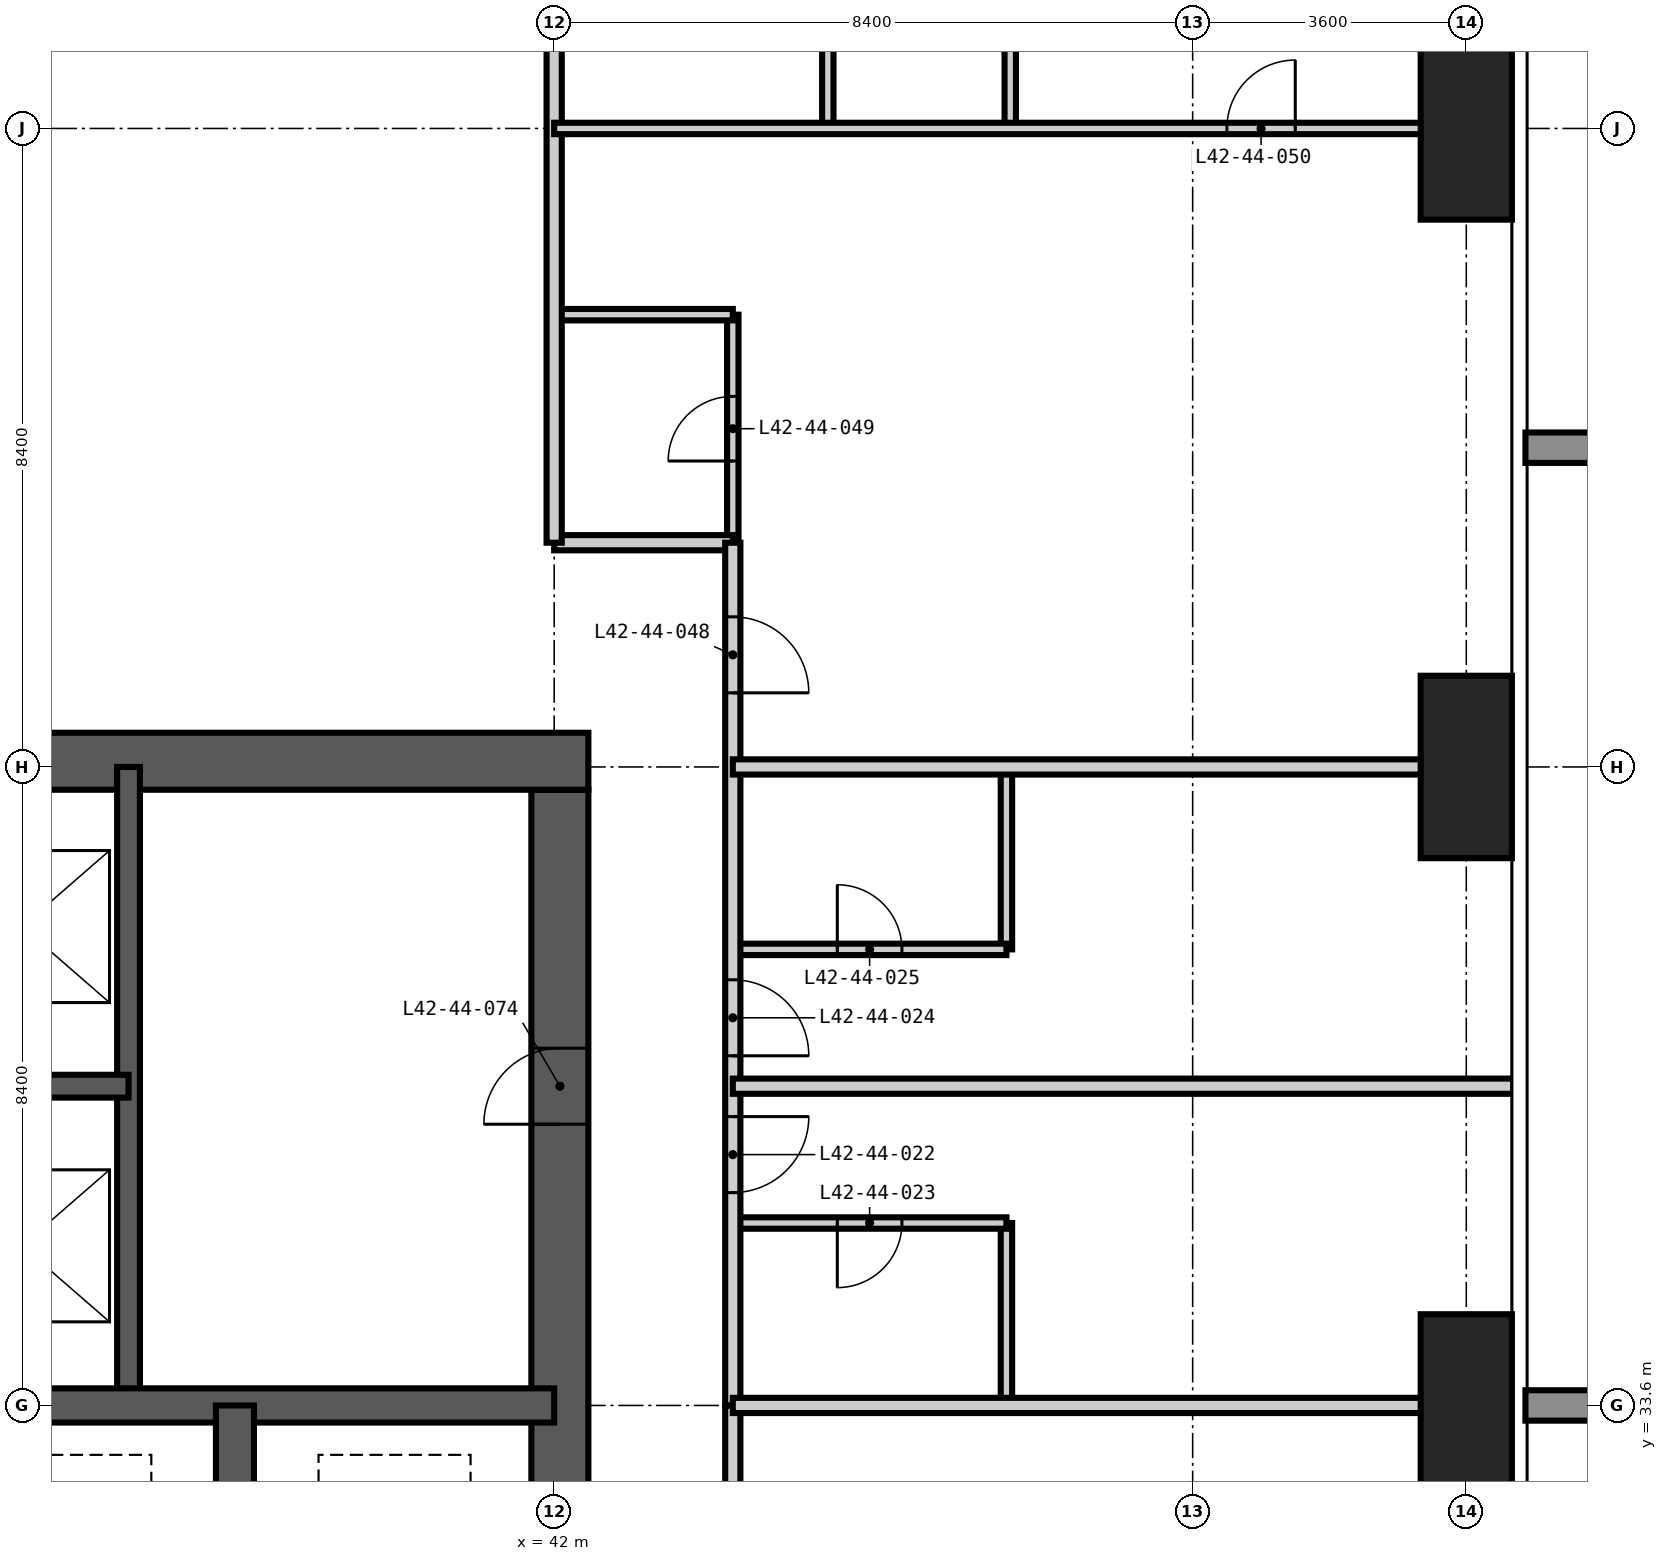
"""IFC4 building model, lengths in metres.
Left out: names, types, materials, properties, quantities, classifications, styles, units other than length and angle.
Written with IfcOpenShell. Run it as: python <this file> out.ifc"""

import sys

from ifc_helpers import new_model, si_unit, direction, frame, frame_2d, origin, origin_2d, place, context, subcontext, project, spatial, rectangle, extrude, element, fill, save


model = new_model("IFC4")
c1 = context("Model", 3, precision=1e-05, world=origin(), true_north=direction((0.0, 1.0)))
c2 = subcontext(c1, "Body", "Model", "MODEL_VIEW")
j1 = project(units=[si_unit("LENGTHUNIT", "METRE"), si_unit("PLANEANGLEUNIT", "RADIAN")], contexts=[c1])
p1 = place(None, origin())
s1 = spatial("IfcSite", under=j1, at=p1, CompositionType="ELEMENT")
p2 = place(p1, origin())
s2 = spatial("IfcBuilding", under=s1, at=p2, CompositionType="ELEMENT")
p3 = place(p2, frame((0.0, 0.0, 166.2)))
s3 = spatial("IfcBuildingStorey", under=s2, at=p3, CompositionType="ELEMENT", Elevation=166.2)
for number, where, z_axis, x_axis in (
    (1, (54.0, 33.6, -0.35), (0.0, 0.0, 1.0), (1.0, 0.0, 0.0)),
    (2, (54.0, 42.0, -0.35), (0.0, 0.0, 1.0), (1.0, 0.0, 0.0)),
    (3, (54.0, 50.4, -0.35), (0.0, 0.0, 1.0), (1.0, 0.0, 0.0)),
):
    element("IfcColumn", number, at=place(p3, frame(where, z_axis=z_axis, x_axis=x_axis)), inside=s3, PredefinedType="COLUMN", context=c2, shape_type="SweptSolid", body=[
        extrude(rectangle(XDim=1.2, YDim=2.4, at=origin_2d()), origin(), (0.0, 0.0, 1.0), 3.6),
    ])
p4 = place(p3, frame((42.075, 17.1, -0.35), z_axis=(0.0, 0.0, 1.0), x_axis=(0.0, 1.0, 0.0)))
e4 = element("IfcWall", 4, at=p4, inside=s3, PredefinedType="SHEAR", context=c2, shape_type="SweptSolid", body=[
    extrude(rectangle(XDim=24.6, YDim=0.75, at=frame_2d((12.3, 0.0))), origin(), (0.0, 0.0, 1.0), 3.6),
])
p5 = place(p4, frame((0.5, 0.0, 0.35)))
e5 = element("IfcOpeningElement", 5, at=p5, cuts=e4, PredefinedType="OPENING", context=c2, shape_type="SweptSolid", body=[
    extrude(rectangle(XDim=1.2, YDim=2.2, at=frame_2d((0.6, 1.1))), frame((0.0, 0.385, 0.0), z_axis=(0.0, -1.0, 0.0), x_axis=(1.0, 0.0, 0.0)), (0.0, 0.0, 1.0), 0.77),
])
p6 = place(p4, frame((11.8, 0.0, 0.35)))
e6 = element("IfcOpeningElement", 6, at=p6, cuts=e4, PredefinedType="OPENING", context=c2, shape_type="SweptSolid", body=[
    extrude(rectangle(XDim=1.0, YDim=2.1, at=frame_2d((0.5, 1.05))), frame((0.0, 0.385, 0.0), z_axis=(0.0, -1.0, 0.0), x_axis=(1.0, 0.0, 0.0)), (0.0, 0.0, 1.0), 0.77),
])
p7 = place(p4, frame((20.2, 0.0, 0.35)))
e7 = element("IfcOpeningElement", 7, at=p7, cuts=e4, PredefinedType="OPENING", context=c2, shape_type="SweptSolid", body=[
    extrude(rectangle(XDim=1.0, YDim=2.1, at=frame_2d((0.5, 1.05))), frame((0.0, 0.385, 0.0), z_axis=(0.0, -1.0, 0.0), x_axis=(1.0, 0.0, 0.0)), (0.0, 0.0, 1.0), 0.77),
])
p8 = place(p3, frame((42.45, 42.075, -0.35), z_axis=(0.0, 0.0, 1.0), x_axis=(-1.0, 0.0, 0.0)))
e8 = element("IfcWall", 8, at=p8, inside=s3, PredefinedType="SHEAR", context=c2, shape_type="SweptSolid", body=[
    extrude(rectangle(XDim=26.1, YDim=0.75, at=frame_2d((13.05, 0.0))), origin(), (0.0, 0.0, 1.0), 3.6),
])
p9 = place(p8, frame((20.95, 0.0, 0.35)))
e9 = element("IfcOpeningElement", 9, at=p9, cuts=e8, PredefinedType="OPENING", context=c2, shape_type="SweptSolid", body=[
    extrude(rectangle(XDim=1.0, YDim=2.1, at=frame_2d((0.5, 1.05))), frame((0.0, 0.385, 0.0), z_axis=(0.0, -1.0, 0.0), x_axis=(1.0, 0.0, 0.0)), (0.0, 0.0, 1.0), 0.77),
])
p10 = place(p8, frame((10.35, 0.0, 0.35)))
e10 = element("IfcOpeningElement", 10, at=p10, cuts=e8, PredefinedType="OPENING", context=c2, shape_type="SweptSolid", body=[
    extrude(rectangle(XDim=1.2, YDim=2.2, at=frame_2d((0.6, 1.1))), frame((0.0, 0.385, 0.0), z_axis=(0.0, -1.0, 0.0), x_axis=(1.0, 0.0, 0.0)), (0.0, 0.0, 1.0), 0.77),
])
p11 = place(p3, frame((36.4, 33.6, -0.35), z_axis=(0.0, 0.0, 1.0), x_axis=(0.0, 1.0, 0.0)))
e11 = element("IfcWall", 11, at=p11, inside=s3, PredefinedType="SHEAR", context=c2, shape_type="SweptSolid", body=[
    extrude(rectangle(XDim=8.4, YDim=0.3, at=frame_2d((4.2, 0.0))), origin(), (0.0, 0.0, 1.0), 3.6),
])
p12 = place(p3, frame((33.6, 37.8, -0.35), z_axis=(0.0, 0.0, 1.0), x_axis=(1.0, 0.0, 0.0)))
e12 = element("IfcWall", 12, at=p12, inside=s3, PredefinedType="SHEAR", context=c2, shape_type="SweptSolid", body=[
    extrude(rectangle(XDim=2.8, YDim=0.3, at=frame_2d((1.4, 0.0))), origin(), (0.0, 0.0, 1.0), 3.6),
])
p13 = place(p3, frame((16.8, 33.6, -0.35), z_axis=(0.0, 0.0, 1.0), x_axis=(1.0, 0.0, 0.0)))
e13 = element("IfcWall", 13, at=p13, inside=s3, PredefinedType="SHEAR", context=c2, shape_type="SweptSolid", body=[
    extrude(rectangle(XDim=25.2, YDim=0.45, at=frame_2d((12.6, 0.0))), origin(), (0.0, 0.0, 1.0), 3.6),
])
p14 = place(p3, frame((37.8, 30.8, -0.35), z_axis=(0.0, 0.0, 1.0), x_axis=(0.0, 1.0, 0.0)))
e14 = element("IfcWall", 14, at=p14, inside=s3, PredefinedType="SHEAR", context=c2, shape_type="SweptSolid", body=[
    extrude(rectangle(XDim=2.8, YDim=0.5, at=frame_2d((1.4, 0.0))), origin(), (0.0, 0.0, 1.0), 3.6),
])
p15 = place(p3, frame((44.35, 44.95, 0.0), z_axis=(0.0, 0.0, 1.0), x_axis=(0.0, 1.0, 0.0)))
e15 = element("IfcWall", 15, at=p15, inside=s3, PredefinedType="PARTITIONING", context=c2, shape_type="SweptSolid", body=[
    extrude(rectangle(XDim=3.0, YDim=0.15, at=frame_2d((1.5, 0.0))), origin(), (0.0, 0.0, 1.0), 3.25),
])
p16 = place(p15, frame((1.075, 0.0, 0.0)))
e16 = element("IfcOpeningElement", 16, at=p16, cuts=e15, PredefinedType="OPENING", context=c2, shape_type="SweptSolid", body=[
    extrude(rectangle(XDim=0.85, YDim=2.1, at=frame_2d((0.425, 1.05))), frame((0.0, 0.085, 0.0), z_axis=(0.0, -1.0, 0.0), x_axis=(1.0, 0.0, 0.0)), (0.0, 0.0, 1.0), 0.17),
])
for number, where, z_axis, x_axis in (
    (17, (47.95, 33.6, 0.0), (0.0, 0.0, 1.0), (0.0, 1.0, 0.0)),
    (18, (47.95, 39.6, 0.0), (0.0, 0.0, 1.0), (0.0, 1.0, 0.0)),
):
    element("IfcWall", number, at=place(p3, frame(where, z_axis=z_axis, x_axis=x_axis)), inside=s3, PredefinedType="PARTITIONING", context=c2, shape_type="SweptSolid", body=[
        extrude(rectangle(XDim=2.4, YDim=0.15, at=frame_2d((1.2, 0.0))), origin(), (0.0, 0.0, 1.0), 3.25),
    ])
p17 = place(p3, frame((44.35, 36.0, 0.0), z_axis=(0.0, 0.0, 1.0), x_axis=(1.0, 0.0, 0.0)))
e19 = element("IfcWall", 19, at=p17, inside=s3, PredefinedType="PARTITIONING", context=c2, shape_type="SweptSolid", body=[
    extrude(rectangle(XDim=3.6, YDim=0.15, at=frame_2d((1.8, 0.0))), origin(), (0.0, 0.0, 1.0), 3.25),
])
p18 = place(p17, frame((1.375, 0.0, 0.0)))
e20 = element("IfcOpeningElement", 20, at=p18, cuts=e19, PredefinedType="OPENING", context=c2, shape_type="SweptSolid", body=[
    extrude(rectangle(XDim=0.85, YDim=2.1, at=frame_2d((0.425, 1.05))), frame((0.0, 0.085, 0.0), z_axis=(0.0, -1.0, 0.0), x_axis=(1.0, 0.0, 0.0)), (0.0, 0.0, 1.0), 0.17),
])
p19 = place(p3, frame((44.35, 39.6, 0.0), z_axis=(0.0, 0.0, 1.0), x_axis=(1.0, 0.0, 0.0)))
e21 = element("IfcWall", 21, at=p19, inside=s3, PredefinedType="PARTITIONING", context=c2, shape_type="SweptSolid", body=[
    extrude(rectangle(XDim=3.6, YDim=0.15, at=frame_2d((1.8, 0.0))), origin(), (0.0, 0.0, 1.0), 3.25),
])
p20 = place(p19, frame((1.375, 0.0, 0.0)))
e22 = element("IfcOpeningElement", 22, at=p20, cuts=e21, PredefinedType="OPENING", context=c2, shape_type="SweptSolid", body=[
    extrude(rectangle(XDim=0.85, YDim=2.1, at=frame_2d((0.425, 1.05))), frame((0.0, 0.085, 0.0), z_axis=(0.0, -1.0, 0.0), x_axis=(1.0, 0.0, 0.0)), (0.0, 0.0, 1.0), 0.17),
])
p21 = place(p3, frame((42.0, 47.95, 0.0), z_axis=(0.0, 0.0, 1.0), x_axis=(1.0, 0.0, 0.0)))
e23 = element("IfcWall", 23, at=p21, inside=s3, PredefinedType="PARTITIONING", context=c2, shape_type="SweptSolid", body=[
    extrude(rectangle(XDim=2.35, YDim=0.15, at=frame_2d((1.175, 0.0))), origin(), (0.0, 0.0, 1.0), 3.25),
])
p22 = place(p3, frame((44.35, 25.2, 0.0), z_axis=(0.0, 0.0, 1.0), x_axis=(0.0, 1.0, 0.0)))
e24 = element("IfcWall", 24, at=p22, inside=s3, PredefinedType="PARTITIONING", context=c2, shape_type="SweptSolid", body=[
    extrude(rectangle(XDim=8.4, YDim=0.2, at=frame_2d((4.2, 0.0))), origin(), (0.0, 0.0, 1.0), 3.25),
])
p23 = place(p22, frame((3.3, 0.0, 0.0)))
e25 = element("IfcOpeningElement", 25, at=p23, cuts=e24, PredefinedType="OPENING", context=c2, shape_type="SweptSolid", body=[
    extrude(rectangle(XDim=1.8, YDim=2.4, at=frame_2d((0.9, 1.2))), frame((0.0, 0.11, 0.0), z_axis=(0.0, -1.0, 0.0), x_axis=(1.0, 0.0, 0.0)), (0.0, 0.0, 1.0), 0.22),
])
p24 = place(p3, frame((42.0, 44.95, 0.0), z_axis=(0.0, 0.0, 1.0), x_axis=(1.0, 0.0, 0.0)))
e26 = element("IfcWall", 26, at=p24, inside=s3, PredefinedType="PARTITIONING", context=c2, shape_type="SweptSolid", body=[
    extrude(rectangle(XDim=2.35, YDim=0.2, at=frame_2d((1.175, 0.0))), origin(), (0.0, 0.0, 1.0), 3.25),
])
p25 = place(p3, frame((42.0, 54.618, 0.0), z_axis=(0.0, 0.0, 1.0), x_axis=(0.0, -1.0, 0.0)))
e27 = element("IfcWall", 27, at=p25, inside=s3, PredefinedType="PARTITIONING", context=c2, shape_type="SweptSolid", body=[
    extrude(rectangle(XDim=9.668, YDim=0.2, at=frame_2d((4.834, 0.0))), origin(), (0.0, 0.0, 1.0), 3.25),
])
p26 = place(p3, frame((44.35, 44.95, 0.0), z_axis=(0.0, 0.0, 1.0), x_axis=(0.0, -1.0, 0.0)))
e28 = element("IfcWall", 28, at=p26, inside=s3, PredefinedType="PARTITIONING", context=c2, shape_type="SweptSolid", body=[
    extrude(rectangle(XDim=11.35, YDim=0.2, at=frame_2d((5.675, 0.0))), origin(), (0.0, 0.0, 1.0), 3.25),
])
p27 = place(p26, frame((7.55, 0.0, 0.0)))
e29 = element("IfcOpeningElement", 29, at=p27, cuts=e28, PredefinedType="OPENING", context=c2, shape_type="SweptSolid", body=[
    extrude(rectangle(XDim=1.0, YDim=2.2, at=frame_2d((0.5, 1.1))), frame((0.0, 0.11, 0.0), z_axis=(0.0, -1.0, 0.0), x_axis=(1.0, 0.0, 0.0)), (0.0, 0.0, 1.0), 0.22),
])
p28 = place(p26, frame((5.75, 0.0, 0.0)))
e30 = element("IfcOpeningElement", 30, at=p28, cuts=e28, PredefinedType="OPENING", context=c2, shape_type="SweptSolid", body=[
    extrude(rectangle(XDim=1.0, YDim=2.2, at=frame_2d((0.5, 1.1))), frame((0.0, 0.11, 0.0), z_axis=(0.0, -1.0, 0.0), x_axis=(1.0, 0.0, 0.0)), (0.0, 0.0, 1.0), 0.22),
])
p29 = place(p26, frame((0.975, 0.0, 0.0)))
e31 = element("IfcOpeningElement", 31, at=p29, cuts=e28, PredefinedType="OPENING", context=c2, shape_type="SweptSolid", body=[
    extrude(rectangle(XDim=1.0, YDim=2.2, at=frame_2d((0.5, 1.1))), frame((0.0, 0.11, 0.0), z_axis=(0.0, -1.0, 0.0), x_axis=(1.0, 0.0, 0.0)), (0.0, 0.0, 1.0), 0.22),
])
for number, where, z_axis, x_axis in (
    (32, (44.35, 33.6, 0.0), (0.0, 0.0, 1.0), (1.0, 0.0, 0.0)),
    (33, (44.35, 37.8, 0.0), (0.0, 0.0, 1.0), (1.0, 0.0, 0.0)),
    (34, (44.35, 42.0, 0.0), (0.0, 0.0, 1.0), (1.0, 0.0, 0.0)),
):
    element("IfcWall", number, at=place(p3, frame(where, z_axis=z_axis, x_axis=x_axis)), inside=s3, PredefinedType="PARTITIONING", context=c2, shape_type="SweptSolid", body=[
        extrude(rectangle(XDim=10.268, YDim=0.2, at=frame_2d((5.134, 0.0))), origin(), (0.0, 0.0, 1.0), 3.25),
    ])
p30 = place(p3, frame((45.6, 50.4, 0.0), z_axis=(0.0, 0.0, 1.0), x_axis=(0.0, 1.0, 0.0)))
e35 = element("IfcWall", 35, at=p30, inside=s3, PredefinedType="PARTITIONING", context=c2, shape_type="SweptSolid", body=[
    extrude(rectangle(XDim=3.0, YDim=0.15, at=frame_2d((1.5, 0.0))), origin(), (0.0, 0.0, 1.0), 3.25),
])
p31 = place(p3, frame((48.0, 50.4, 0.0), z_axis=(0.0, 0.0, 1.0), x_axis=(0.0, 1.0, 0.0)))
e36 = element("IfcWall", 36, at=p31, inside=s3, PredefinedType="PARTITIONING", context=c2, shape_type="SweptSolid", body=[
    extrude(rectangle(XDim=3.0, YDim=0.15, at=frame_2d((1.5, 0.0))), origin(), (0.0, 0.0, 1.0), 3.25),
])
p32 = place(p31, frame((1.05, 0.0, 0.0)))
e37 = element("IfcOpeningElement", 37, at=p32, cuts=e36, PredefinedType="OPENING", context=c2, shape_type="SweptSolid", body=[
    extrude(rectangle(XDim=0.9, YDim=2.1, at=frame_2d((0.45, 1.05))), frame((0.0, 0.085, 0.0), z_axis=(0.0, -1.0, 0.0), x_axis=(1.0, 0.0, 0.0)), (0.0, 0.0, 1.0), 0.17),
])
p33 = place(p3, frame((42.0, 50.4, 0.0), z_axis=(0.0, 0.0, 1.0), x_axis=(1.0, 0.0, 0.0)))
e38 = element("IfcWall", 38, at=p33, inside=s3, PredefinedType="PARTITIONING", context=c2, shape_type="SweptSolid", body=[
    extrude(rectangle(XDim=12.618, YDim=0.15, at=frame_2d((6.309, 0.0))), origin(), (0.0, 0.0, 1.0), 3.25),
])
p34 = place(p33, frame((8.85, 0.0, 0.0)))
e39 = element("IfcOpeningElement", 39, at=p34, cuts=e38, PredefinedType="OPENING", context=c2, shape_type="SweptSolid", body=[
    extrude(rectangle(XDim=0.9, YDim=2.1, at=frame_2d((0.45, 1.05))), frame((0.0, 0.085, 0.0), z_axis=(0.0, -1.0, 0.0), x_axis=(1.0, 0.0, 0.0)), (0.0, 0.0, 1.0), 0.17),
])
p35 = place(p27, origin())
e40 = element("IfcDoor", 40, at=p35, inside=s3, OperationType="SINGLE_SWING_LEFT", PredefinedType="DOOR", context=c2, shape_type="SweptSolid", body=[
    extrude(rectangle(XDim=1.0, YDim=2.2, at=frame_2d((0.5, 1.1))), frame((0.0, 0.025, 0.0), z_axis=(0.0, -1.0, 0.0), x_axis=(1.0, 0.0, 0.0)), (0.0, 0.0, 1.0), 0.05),
])
fill(e29, e40)
p36 = place(p18, frame((0.85, 0.0, 0.0), z_axis=(0.0, 0.0, 1.0), x_axis=(-1.0, 0.0, 0.0)))
e41 = element("IfcDoor", 41, at=p36, inside=s3, OperationType="SINGLE_SWING_RIGHT", PredefinedType="DOOR", context=c2, shape_type="SweptSolid", body=[
    extrude(rectangle(XDim=0.85, YDim=2.1, at=frame_2d((0.425, 1.05))), frame((0.0, 0.025, 0.0), z_axis=(0.0, -1.0, 0.0), x_axis=(1.0, 0.0, 0.0)), (0.0, 0.0, 1.0), 0.05),
])
fill(e20, e41)
p37 = place(p28, origin())
e42 = element("IfcDoor", 42, at=p37, inside=s3, OperationType="SINGLE_SWING_RIGHT", PredefinedType="DOOR", context=c2, shape_type="SweptSolid", body=[
    extrude(rectangle(XDim=1.0, YDim=2.2, at=frame_2d((0.5, 1.1))), frame((0.0, 0.025, 0.0), z_axis=(0.0, -1.0, 0.0), x_axis=(1.0, 0.0, 0.0)), (0.0, 0.0, 1.0), 0.05),
])
fill(e30, e42)
p38 = place(p20, origin())
e43 = element("IfcDoor", 43, at=p38, inside=s3, OperationType="SINGLE_SWING_LEFT", PredefinedType="DOOR", context=c2, shape_type="SweptSolid", body=[
    extrude(rectangle(XDim=0.85, YDim=2.1, at=frame_2d((0.425, 1.05))), frame((0.0, 0.025, 0.0), z_axis=(0.0, -1.0, 0.0), x_axis=(1.0, 0.0, 0.0)), (0.0, 0.0, 1.0), 0.05),
])
fill(e22, e43)
p39 = place(p29, origin())
e44 = element("IfcDoor", 44, at=p39, inside=s3, OperationType="SINGLE_SWING_RIGHT", PredefinedType="DOOR", context=c2, shape_type="SweptSolid", body=[
    extrude(rectangle(XDim=1.0, YDim=2.2, at=frame_2d((0.5, 1.1))), frame((0.0, 0.025, 0.0), z_axis=(0.0, -1.0, 0.0), x_axis=(1.0, 0.0, 0.0)), (0.0, 0.0, 1.0), 0.05),
])
fill(e31, e44)
p40 = place(p16, origin())
e45 = element("IfcDoor", 45, at=p40, inside=s3, OperationType="SINGLE_SWING_LEFT", PredefinedType="DOOR", context=c2, shape_type="SweptSolid", body=[
    extrude(rectangle(XDim=0.85, YDim=2.1, at=frame_2d((0.425, 1.05))), frame((0.0, 0.025, 0.0), z_axis=(0.0, -1.0, 0.0), x_axis=(1.0, 0.0, 0.0)), (0.0, 0.0, 1.0), 0.05),
])
fill(e16, e45)
p41 = place(p34, origin())
e46 = element("IfcDoor", 46, at=p41, inside=s3, OperationType="SINGLE_SWING_RIGHT", PredefinedType="DOOR", context=c2, shape_type="SweptSolid", body=[
    extrude(rectangle(XDim=0.9, YDim=2.1, at=frame_2d((0.45, 1.05))), frame((0.0, 0.025, 0.0), z_axis=(0.0, -1.0, 0.0), x_axis=(1.0, 0.0, 0.0)), (0.0, 0.0, 1.0), 0.05),
])
fill(e39, e46)
p42 = place(p7, origin())
e47 = element("IfcDoor", 47, at=p42, inside=s3, OperationType="SINGLE_SWING_LEFT", PredefinedType="DOOR", context=c2, shape_type="SweptSolid", body=[
    extrude(rectangle(XDim=1.0, YDim=2.1, at=frame_2d((0.5, 1.05))), frame((0.0, 0.025, 0.0), z_axis=(0.0, -1.0, 0.0), x_axis=(1.0, 0.0, 0.0)), (0.0, 0.0, 1.0), 0.05),
])
fill(e7, e47)
save(model, sys.argv[1])
